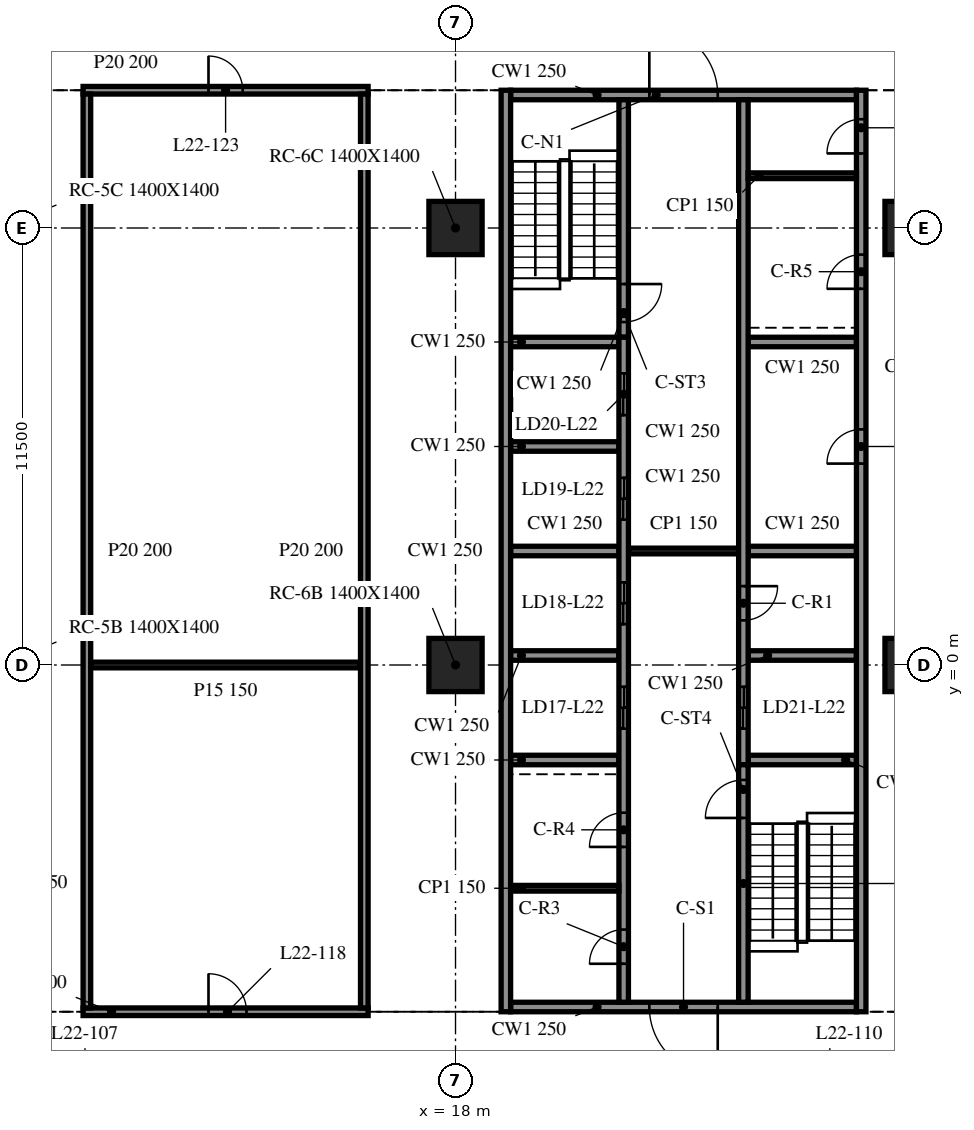
"""IFC4 building model, lengths in metres.
Left out: names, types, materials, properties, quantities, classifications, styles, units other than length and angle.
Written with IfcOpenShell. Run it as: python <this file> out.ifc"""

import sys

from ifc_helpers import new_model, si_unit, direction, frame, frame_2d, origin, origin_2d, place, context, subcontext, project, spatial, rectangle, extrude, element, fill, save


model = new_model("IFC4")
c1 = context("Model", 3, precision=1e-05, world=origin(), true_north=direction((0.0, 1.0)))
c2 = subcontext(c1, "Body", "Model", "MODEL_VIEW")
j1 = project(units=[si_unit("LENGTHUNIT", "METRE"), si_unit("PLANEANGLEUNIT", "RADIAN")], contexts=[c1])
p1 = place(None, origin())
s1 = spatial("IfcSite", under=j1, at=p1, CompositionType="ELEMENT")
p2 = place(p1, origin())
s2 = spatial("IfcBuilding", under=s1, at=p2, CompositionType="ELEMENT")
p3 = place(p2, frame((0.0, 0.0, 97.1)))
s3 = spatial("IfcBuildingStorey", under=s2, at=p3, CompositionType="ELEMENT", Elevation=97.1)
for number, where, z_axis, x_axis in (
    (1, (18.0, 0.0, -0.34), (0.0, 0.0, 1.0), (1.0, 0.0, 0.0)),
    (2, (18.0, 11.5, -0.34), (0.0, 0.0, 1.0), (1.0, 0.0, 0.0)),
    (3, (30.0, 0.0, -0.34), (0.0, 0.0, 1.0), (1.0, 0.0, 0.0)),
    (4, (30.0, 11.5, -0.34), (0.0, 0.0, 1.0), (1.0, 0.0, 0.0)),
):
    element("IfcColumn", number, at=place(p3, frame(where, z_axis=z_axis, x_axis=x_axis)), inside=s3, PredefinedType="COLUMN", context=c2, shape_type="SweptSolid", body=[
        extrude(rectangle(XDim=1.4, YDim=1.4, at=origin_2d()), origin(), (0.0, 0.0, 1.0), 4.1),
    ])
p4 = place(p3, frame((19.325, 15.125, 0.0), z_axis=(0.0, 0.0, 1.0), x_axis=(0.0, -1.0, 0.0)))
e5 = element("IfcWall", 5, at=p4, inside=s3, PredefinedType="SOLIDWALL", context=c2, shape_type="SweptSolid", body=[
    extrude(rectangle(XDim=24.25, YDim=0.25, at=frame_2d((12.125, 0.0))), origin(), (0.0, 0.0, 1.0), 3.76),
])
p5 = place(p3, frame((28.675, -9.125, 0.0), z_axis=(0.0, 0.0, 1.0), x_axis=(0.0, 1.0, 0.0)))
e6 = element("IfcWall", 6, at=p5, inside=s3, PredefinedType="SOLIDWALL", context=c2, shape_type="SweptSolid", body=[
    extrude(rectangle(XDim=24.25, YDim=0.25, at=frame_2d((12.125, 0.0))), origin(), (0.0, 0.0, 1.0), 3.76),
])
p6 = place(p5, frame((14.425, 0.0, 0.0)))
e7 = element("IfcOpeningElement", 7, at=p6, cuts=e6, PredefinedType="OPENING", context=c2, shape_type="SweptSolid", body=[
    extrude(rectangle(XDim=0.9, YDim=2.1, at=frame_2d((0.45, 1.05))), frame((0.0, 0.135, 0.0), z_axis=(0.0, -1.0, 0.0), x_axis=(1.0, 0.0, 0.0)), (0.0, 0.0, 1.0), 0.27),
])
p7 = place(p5, frame((19.025, 0.0, 0.0)))
e8 = element("IfcOpeningElement", 8, at=p7, cuts=e6, PredefinedType="OPENING", context=c2, shape_type="SweptSolid", body=[
    extrude(rectangle(XDim=0.9, YDim=2.1, at=frame_2d((0.45, 1.05))), frame((0.0, 0.135, 0.0), z_axis=(0.0, -1.0, 0.0), x_axis=(1.0, 0.0, 0.0)), (0.0, 0.0, 1.0), 0.27),
])
p8 = place(p5, frame((22.587, 0.0, 0.0)))
e9 = element("IfcOpeningElement", 9, at=p8, cuts=e6, PredefinedType="OPENING", context=c2, shape_type="SweptSolid", body=[
    extrude(rectangle(XDim=0.9, YDim=2.1, at=frame_2d((0.45, 1.05))), frame((0.0, 0.135, 0.0), z_axis=(0.0, -1.0, 0.0), x_axis=(1.0, 0.0, 0.0)), (0.0, 0.0, 1.0), 0.27),
])
p9 = place(p3, frame((28.55, -9.0, 0.0), z_axis=(0.0, 0.0, 1.0), x_axis=(-1.0, 0.0, 0.0)))
e10 = element("IfcWall", 10, at=p9, inside=s3, PredefinedType="SOLIDWALL", context=c2, shape_type="SweptSolid", body=[
    extrude(rectangle(XDim=9.1, YDim=0.25, at=frame_2d((4.55, 0.0))), origin(), (0.0, 0.0, 1.0), 3.76),
])
p10 = place(p9, frame((3.65, 0.0, 0.0)))
e11 = element("IfcOpeningElement", 11, at=p10, cuts=e10, PredefinedType="OPENING", context=c2, shape_type="SweptSolid", body=[
    extrude(rectangle(XDim=1.8, YDim=2.1, at=frame_2d((0.9, 1.05))), frame((0.0, 0.135, 0.0), z_axis=(0.0, -1.0, 0.0), x_axis=(1.0, 0.0, 0.0)), (0.0, 0.0, 1.0), 0.27),
])
p11 = place(p3, frame((19.45, 15.0, 0.0), z_axis=(0.0, 0.0, 1.0), x_axis=(1.0, 0.0, 0.0)))
e12 = element("IfcWall", 12, at=p11, inside=s3, PredefinedType="SOLIDWALL", context=c2, shape_type="SweptSolid", body=[
    extrude(rectangle(XDim=9.1, YDim=0.25, at=frame_2d((4.55, 0.0))), origin(), (0.0, 0.0, 1.0), 3.76),
])
p12 = place(p11, frame((3.65, 0.0, 0.0)))
e13 = element("IfcOpeningElement", 13, at=p12, cuts=e12, PredefinedType="OPENING", context=c2, shape_type="SweptSolid", body=[
    extrude(rectangle(XDim=1.8, YDim=2.1, at=frame_2d((0.9, 1.05))), frame((0.0, 0.135, 0.0), z_axis=(0.0, -1.0, 0.0), x_axis=(1.0, 0.0, 0.0)), (0.0, 0.0, 1.0), 0.27),
])
p13 = place(p3, frame((22.425, -8.875, 0.0), z_axis=(0.0, 0.0, 1.0), x_axis=(0.0, 1.0, 0.0)))
e14 = element("IfcWall", 14, at=p13, inside=s3, PredefinedType="SOLIDWALL", context=c2, shape_type="SweptSolid", body=[
    extrude(rectangle(XDim=17.5, YDim=0.25, at=frame_2d((8.75, 0.0))), origin(), (0.0, 0.0, 1.0), 3.76),
])
p14 = place(p13, frame((7.2, 0.0, 0.0)))
e15 = element("IfcOpeningElement", 15, at=p14, cuts=e14, PredefinedType="OPENING", context=c2, shape_type="SweptSolid", body=[
    extrude(rectangle(XDim=1.1, YDim=2.1, at=frame_2d((0.55, 1.05))), frame((0.0, 0.135, 0.0), z_axis=(0.0, -1.0, 0.0), x_axis=(1.0, 0.0, 0.0)), (0.0, 0.0, 1.0), 0.27),
])
p15 = place(p13, frame((9.95, 0.0, 0.0)))
e16 = element("IfcOpeningElement", 16, at=p15, cuts=e14, PredefinedType="OPENING", context=c2, shape_type="SweptSolid", body=[
    extrude(rectangle(XDim=1.1, YDim=2.1, at=frame_2d((0.55, 1.05))), frame((0.0, 0.135, 0.0), z_axis=(0.0, -1.0, 0.0), x_axis=(1.0, 0.0, 0.0)), (0.0, 0.0, 1.0), 0.27),
])
p16 = place(p13, frame((12.7, 0.0, 0.0)))
e17 = element("IfcOpeningElement", 17, at=p16, cuts=e14, PredefinedType="OPENING", context=c2, shape_type="SweptSolid", body=[
    extrude(rectangle(XDim=1.1, YDim=2.1, at=frame_2d((0.55, 1.05))), frame((0.0, 0.135, 0.0), z_axis=(0.0, -1.0, 0.0), x_axis=(1.0, 0.0, 0.0)), (0.0, 0.0, 1.0), 0.27),
])
p17 = place(p13, frame((15.45, 0.0, 0.0)))
e18 = element("IfcOpeningElement", 18, at=p17, cuts=e14, PredefinedType="OPENING", context=c2, shape_type="SweptSolid", body=[
    extrude(rectangle(XDim=1.1, YDim=2.1, at=frame_2d((0.55, 1.05))), frame((0.0, 0.135, 0.0), z_axis=(0.0, -1.0, 0.0), x_axis=(1.0, 0.0, 0.0)), (0.0, 0.0, 1.0), 0.27),
])
p18 = place(p13, frame((1.012, 0.0, 0.0)))
e19 = element("IfcOpeningElement", 19, at=p18, cuts=e14, PredefinedType="OPENING", context=c2, shape_type="SweptSolid", body=[
    extrude(rectangle(XDim=0.9, YDim=2.1, at=frame_2d((0.45, 1.05))), frame((0.0, 0.135, 0.0), z_axis=(0.0, -1.0, 0.0), x_axis=(1.0, 0.0, 0.0)), (0.0, 0.0, 1.0), 0.27),
])
p19 = place(p13, frame((4.087, 0.0, 0.0)))
e20 = element("IfcOpeningElement", 20, at=p19, cuts=e14, PredefinedType="OPENING", context=c2, shape_type="SweptSolid", body=[
    extrude(rectangle(XDim=0.9, YDim=2.1, at=frame_2d((0.45, 1.05))), frame((0.0, 0.135, 0.0), z_axis=(0.0, -1.0, 0.0), x_axis=(1.0, 0.0, 0.0)), (0.0, 0.0, 1.0), 0.27),
])
p20 = place(p3, frame((22.425, 14.875, 0.0), z_axis=(0.0, 0.0, 1.0), x_axis=(0.0, -1.0, 0.0)))
e21 = element("IfcWall", 21, at=p20, inside=s3, PredefinedType="SOLIDWALL", context=c2, shape_type="SweptSolid", body=[
    extrude(rectangle(XDim=6.25, YDim=0.25, at=frame_2d((3.125, 0.0))), origin(), (0.0, 0.0, 1.0), 3.76),
])
p21 = place(p20, frame((4.85, 0.0, 0.0)))
e22 = element("IfcOpeningElement", 22, at=p21, cuts=e21, PredefinedType="OPENING", context=c2, shape_type="SweptSolid", body=[
    extrude(rectangle(XDim=1.0, YDim=2.1, at=frame_2d((0.5, 1.05))), frame((0.0, 0.135, 0.0), z_axis=(0.0, -1.0, 0.0), x_axis=(1.0, 0.0, 0.0)), (0.0, 0.0, 1.0), 0.27),
])
p22 = place(p3, frame((25.575, -8.875, 0.0), z_axis=(0.0, 0.0, 1.0), x_axis=(0.0, 1.0, 0.0)))
e23 = element("IfcWall", 23, at=p22, inside=s3, PredefinedType="SOLIDWALL", context=c2, shape_type="SweptSolid", body=[
    extrude(rectangle(XDim=6.25, YDim=0.25, at=frame_2d((3.125, 0.0))), origin(), (0.0, 0.0, 1.0), 3.76),
])
p23 = place(p22, frame((4.85, 0.0, 0.0)))
e24 = element("IfcOpeningElement", 24, at=p23, cuts=e23, PredefinedType="OPENING", context=c2, shape_type="SweptSolid", body=[
    extrude(rectangle(XDim=1.0, YDim=2.1, at=frame_2d((0.5, 1.05))), frame((0.0, 0.135, 0.0), z_axis=(0.0, -1.0, 0.0), x_axis=(1.0, 0.0, 0.0)), (0.0, 0.0, 1.0), 0.27),
])
p24 = place(p3, frame((25.575, 14.875, 0.0), z_axis=(0.0, 0.0, 1.0), x_axis=(0.0, -1.0, 0.0)))
e25 = element("IfcWall", 25, at=p24, inside=s3, PredefinedType="SOLIDWALL", context=c2, shape_type="SweptSolid", body=[
    extrude(rectangle(XDim=17.5, YDim=0.25, at=frame_2d((8.75, 0.0))), origin(), (0.0, 0.0, 1.0), 3.76),
])
p25 = place(p24, frame((15.45, 0.0, 0.0)))
e26 = element("IfcOpeningElement", 26, at=p25, cuts=e25, PredefinedType="OPENING", context=c2, shape_type="SweptSolid", body=[
    extrude(rectangle(XDim=1.1, YDim=2.1, at=frame_2d((0.55, 1.05))), frame((0.0, 0.135, 0.0), z_axis=(0.0, -1.0, 0.0), x_axis=(1.0, 0.0, 0.0)), (0.0, 0.0, 1.0), 0.27),
])
p26 = place(p24, frame((12.8, 0.0, 0.0)))
e27 = element("IfcOpeningElement", 27, at=p26, cuts=e25, PredefinedType="OPENING", context=c2, shape_type="SweptSolid", body=[
    extrude(rectangle(XDim=0.9, YDim=2.1, at=frame_2d((0.45, 1.05))), frame((0.0, 0.135, 0.0), z_axis=(0.0, -1.0, 0.0), x_axis=(1.0, 0.0, 0.0)), (0.0, 0.0, 1.0), 0.27),
])
for number, where, z_axis, x_axis in (
    (28, (19.45, -2.5, 0.0), (0.0, 0.0, 1.0), (1.0, 0.0, 0.0)),
    (29, (19.45, 0.25, 0.0), (0.0, 0.0, 1.0), (1.0, 0.0, 0.0)),
    (30, (19.45, 3.0, 0.0), (0.0, 0.0, 1.0), (1.0, 0.0, 0.0)),
    (31, (19.45, 5.75, 0.0), (0.0, 0.0, 1.0), (1.0, 0.0, 0.0)),
    (32, (19.45, 8.5, 0.0), (0.0, 0.0, 1.0), (1.0, 0.0, 0.0)),
    (33, (25.7, -2.5, 0.0), (0.0, 0.0, 1.0), (1.0, 0.0, 0.0)),
    (34, (25.7, 0.25, 0.0), (0.0, 0.0, 1.0), (1.0, 0.0, 0.0)),
    (35, (25.7, 3.0, 0.0), (0.0, 0.0, 1.0), (1.0, 0.0, 0.0)),
    (36, (25.7, 8.5, 0.0), (0.0, 0.0, 1.0), (1.0, 0.0, 0.0)),
):
    element("IfcWall", number, at=place(p3, frame(where, z_axis=z_axis, x_axis=x_axis)), inside=s3, PredefinedType="SOLIDWALL", context=c2, shape_type="SweptSolid", body=[
        extrude(rectangle(XDim=2.85, YDim=0.25, at=frame_2d((1.425, 0.0))), origin(), (0.0, 0.0, 1.0), 3.76),
    ])
p27 = place(p3, frame((22.55, 3.0, 0.0), z_axis=(0.0, 0.0, 1.0), x_axis=(1.0, 0.0, 0.0)))
e37 = element("IfcWall", 37, at=p27, inside=s3, PredefinedType="PARTITIONING", context=c2, shape_type="SweptSolid", body=[
    extrude(rectangle(XDim=2.9, YDim=0.15, at=frame_2d((1.45, 0.0))), origin(), (0.0, 0.0, 1.0), 3.76),
])
for number, where, z_axis, x_axis in (
    (38, (19.45, -5.875, 0.0), (0.0, 0.0, 1.0), (1.0, 0.0, 0.0)),
    (39, (25.7, 12.875, 0.0), (0.0, 0.0, 1.0), (1.0, 0.0, 0.0)),
):
    element("IfcWall", number, at=place(p3, frame(where, z_axis=z_axis, x_axis=x_axis)), inside=s3, PredefinedType="PARTITIONING", context=c2, shape_type="SweptSolid", body=[
        extrude(rectangle(XDim=2.85, YDim=0.15, at=frame_2d((1.425, 0.0))), origin(), (0.0, 0.0, 1.0), 3.76),
    ])
p28 = place(p3, frame((8.2, -9.125, 0.0), z_axis=(0.0, 0.0, 1.0), x_axis=(1.0, 0.0, 0.0)))
e40 = element("IfcWall", 40, at=p28, inside=s3, PredefinedType="PARTITIONING", context=c2, shape_type="SweptSolid", body=[
    extrude(rectangle(XDim=7.5, YDim=0.2, at=frame_2d((3.75, 0.0))), origin(), (0.0, 0.0, 1.0), 3.76),
])
p29 = place(p28, frame((3.3, 0.0, 0.0)))
e41 = element("IfcOpeningElement", 41, at=p29, cuts=e40, PredefinedType="OPENING", context=c2, shape_type="SweptSolid", body=[
    extrude(rectangle(XDim=1.0, YDim=2.1, at=frame_2d((0.5, 1.05))), frame((0.0, 0.11, 0.0), z_axis=(0.0, -1.0, 0.0), x_axis=(1.0, 0.0, 0.0)), (0.0, 0.0, 1.0), 0.22),
])
p30 = place(p3, frame((8.4, 0.0, 0.0), z_axis=(0.0, 0.0, 1.0), x_axis=(1.0, 0.0, 0.0)))
e42 = element("IfcWall", 42, at=p30, inside=s3, PredefinedType="PARTITIONING", context=c2, shape_type="SweptSolid", body=[
    extrude(rectangle(XDim=7.1, YDim=0.15, at=frame_2d((3.55, 0.0))), origin(), (0.0, 0.0, 1.0), 3.76),
])
p31 = place(p3, frame((8.2, 15.125, 0.0), z_axis=(0.0, 0.0, 1.0), x_axis=(1.0, 0.0, 0.0)))
e43 = element("IfcWall", 43, at=p31, inside=s3, PredefinedType="PARTITIONING", context=c2, shape_type="SweptSolid", body=[
    extrude(rectangle(XDim=7.5, YDim=0.2, at=frame_2d((3.75, 0.0))), origin(), (0.0, 0.0, 1.0), 3.76),
])
p32 = place(p31, frame((3.3, 0.0, 0.0)))
e44 = element("IfcOpeningElement", 44, at=p32, cuts=e43, PredefinedType="OPENING", context=c2, shape_type="SweptSolid", body=[
    extrude(rectangle(XDim=0.9, YDim=2.1, at=frame_2d((0.45, 1.05))), frame((0.0, 0.11, 0.0), z_axis=(0.0, -1.0, 0.0), x_axis=(1.0, 0.0, 0.0)), (0.0, 0.0, 1.0), 0.22),
])
for number, where, z_axis, x_axis in (
    (45, (8.3, -9.025, 0.0), (0.0, 0.0, 1.0), (0.0, 1.0, 0.0)),
    (46, (15.6, -9.025, 0.0), (0.0, 0.0, 1.0), (0.0, 1.0, 0.0)),
):
    element("IfcWall", number, at=place(p3, frame(where, z_axis=z_axis, x_axis=x_axis)), inside=s3, PredefinedType="PARTITIONING", context=c2, shape_type="SweptSolid", body=[
        extrude(rectangle(XDim=24.05, YDim=0.2, at=frame_2d((12.025, 0.0))), origin(), (0.0, 0.0, 1.0), 3.76),
    ])
p33 = place(p10, origin())
e47 = element("IfcDoor", 47, at=p33, inside=s3, OperationType="DOUBLE_DOOR_SINGLE_SWING", PredefinedType="DOOR", context=c2, shape_type="SweptSolid", body=[
    extrude(rectangle(XDim=1.8, YDim=2.1, at=frame_2d((0.9, 1.05))), frame((0.0, 0.025, 0.0), z_axis=(0.0, -1.0, 0.0), x_axis=(1.0, 0.0, 0.0)), (0.0, 0.0, 1.0), 0.05),
])
fill(e11, e47)
p34 = place(p12, origin())
e48 = element("IfcDoor", 48, at=p34, inside=s3, OperationType="DOUBLE_DOOR_SINGLE_SWING", PredefinedType="DOOR", context=c2, shape_type="SweptSolid", body=[
    extrude(rectangle(XDim=1.8, YDim=2.1, at=frame_2d((0.9, 1.05))), frame((0.0, 0.025, 0.0), z_axis=(0.0, -1.0, 0.0), x_axis=(1.0, 0.0, 0.0)), (0.0, 0.0, 1.0), 0.05),
])
fill(e13, e48)
p35 = place(p25, origin())
e49 = element("IfcDoor", 49, at=p35, inside=s3, OperationType="DOUBLE_DOOR_SLIDING", PredefinedType="DOOR", context=c2, shape_type="SweptSolid", body=[
    extrude(rectangle(XDim=1.1, YDim=2.1, at=frame_2d((0.55, 1.05))), frame((0.0, 0.025, 0.0), z_axis=(0.0, -1.0, 0.0), x_axis=(1.0, 0.0, 0.0)), (0.0, 0.0, 1.0), 0.05),
])
fill(e26, e49)
p36 = place(p14, origin())
e50 = element("IfcDoor", 50, at=p36, inside=s3, OperationType="DOUBLE_DOOR_SLIDING", PredefinedType="DOOR", context=c2, shape_type="SweptSolid", body=[
    extrude(rectangle(XDim=1.1, YDim=2.1, at=frame_2d((0.55, 1.05))), frame((0.0, 0.025, 0.0), z_axis=(0.0, -1.0, 0.0), x_axis=(1.0, 0.0, 0.0)), (0.0, 0.0, 1.0), 0.05),
])
fill(e15, e50)
p37 = place(p15, origin())
e51 = element("IfcDoor", 51, at=p37, inside=s3, OperationType="DOUBLE_DOOR_SLIDING", PredefinedType="DOOR", context=c2, shape_type="SweptSolid", body=[
    extrude(rectangle(XDim=1.1, YDim=2.1, at=frame_2d((0.55, 1.05))), frame((0.0, 0.025, 0.0), z_axis=(0.0, -1.0, 0.0), x_axis=(1.0, 0.0, 0.0)), (0.0, 0.0, 1.0), 0.05),
])
fill(e16, e51)
p38 = place(p16, origin())
e52 = element("IfcDoor", 52, at=p38, inside=s3, OperationType="DOUBLE_DOOR_SLIDING", PredefinedType="DOOR", context=c2, shape_type="SweptSolid", body=[
    extrude(rectangle(XDim=1.1, YDim=2.1, at=frame_2d((0.55, 1.05))), frame((0.0, 0.025, 0.0), z_axis=(0.0, -1.0, 0.0), x_axis=(1.0, 0.0, 0.0)), (0.0, 0.0, 1.0), 0.05),
])
fill(e17, e52)
p39 = place(p17, origin())
e53 = element("IfcDoor", 53, at=p39, inside=s3, OperationType="DOUBLE_DOOR_SLIDING", PredefinedType="DOOR", context=c2, shape_type="SweptSolid", body=[
    extrude(rectangle(XDim=1.1, YDim=2.1, at=frame_2d((0.55, 1.05))), frame((0.0, 0.025, 0.0), z_axis=(0.0, -1.0, 0.0), x_axis=(1.0, 0.0, 0.0)), (0.0, 0.0, 1.0), 0.05),
])
fill(e18, e53)
p40 = place(p26, origin())
e54 = element("IfcDoor", 54, at=p40, inside=s3, OperationType="SINGLE_SWING_LEFT", PredefinedType="DOOR", context=c2, shape_type="SweptSolid", body=[
    extrude(rectangle(XDim=0.9, YDim=2.1, at=frame_2d((0.45, 1.05))), frame((0.0, 0.025, 0.0), z_axis=(0.0, -1.0, 0.0), x_axis=(1.0, 0.0, 0.0)), (0.0, 0.0, 1.0), 0.05),
])
fill(e27, e54)
p41 = place(p6, origin())
e55 = element("IfcDoor", 55, at=p41, inside=s3, OperationType="SINGLE_SWING_RIGHT", PredefinedType="DOOR", context=c2, shape_type="SweptSolid", body=[
    extrude(rectangle(XDim=0.9, YDim=2.1, at=frame_2d((0.45, 1.05))), frame((0.0, 0.025, 0.0), z_axis=(0.0, -1.0, 0.0), x_axis=(1.0, 0.0, 0.0)), (0.0, 0.0, 1.0), 0.05),
])
fill(e7, e55)
p42 = place(p18, origin())
e56 = element("IfcDoor", 56, at=p42, inside=s3, OperationType="SINGLE_SWING_LEFT", PredefinedType="DOOR", context=c2, shape_type="SweptSolid", body=[
    extrude(rectangle(XDim=0.9, YDim=2.1, at=frame_2d((0.45, 1.05))), frame((0.0, 0.025, 0.0), z_axis=(0.0, -1.0, 0.0), x_axis=(1.0, 0.0, 0.0)), (0.0, 0.0, 1.0), 0.05),
])
fill(e19, e56)
p43 = place(p19, origin())
e57 = element("IfcDoor", 57, at=p43, inside=s3, OperationType="SINGLE_SWING_RIGHT", PredefinedType="DOOR", context=c2, shape_type="SweptSolid", body=[
    extrude(rectangle(XDim=0.9, YDim=2.1, at=frame_2d((0.45, 1.05))), frame((0.0, 0.025, 0.0), z_axis=(0.0, -1.0, 0.0), x_axis=(1.0, 0.0, 0.0)), (0.0, 0.0, 1.0), 0.05),
])
fill(e20, e57)
p44 = place(p7, origin())
e58 = element("IfcDoor", 58, at=p44, inside=s3, OperationType="SINGLE_SWING_LEFT", PredefinedType="DOOR", context=c2, shape_type="SweptSolid", body=[
    extrude(rectangle(XDim=0.9, YDim=2.1, at=frame_2d((0.45, 1.05))), frame((0.0, 0.025, 0.0), z_axis=(0.0, -1.0, 0.0), x_axis=(1.0, 0.0, 0.0)), (0.0, 0.0, 1.0), 0.05),
])
fill(e8, e58)
p45 = place(p8, origin())
e59 = element("IfcDoor", 59, at=p45, inside=s3, OperationType="SINGLE_SWING_RIGHT", PredefinedType="DOOR", context=c2, shape_type="SweptSolid", body=[
    extrude(rectangle(XDim=0.9, YDim=2.1, at=frame_2d((0.45, 1.05))), frame((0.0, 0.025, 0.0), z_axis=(0.0, -1.0, 0.0), x_axis=(1.0, 0.0, 0.0)), (0.0, 0.0, 1.0), 0.05),
])
fill(e9, e59)
p46 = place(p21, origin())
e60 = element("IfcDoor", 60, at=p46, inside=s3, OperationType="SINGLE_SWING_LEFT", PredefinedType="DOOR", context=c2, shape_type="SweptSolid", body=[
    extrude(rectangle(XDim=1.0, YDim=2.1, at=frame_2d((0.5, 1.05))), frame((0.0, 0.025, 0.0), z_axis=(0.0, -1.0, 0.0), x_axis=(1.0, 0.0, 0.0)), (0.0, 0.0, 1.0), 0.05),
])
fill(e22, e60)
p47 = place(p23, origin())
e61 = element("IfcDoor", 61, at=p47, inside=s3, OperationType="SINGLE_SWING_RIGHT", PredefinedType="DOOR", context=c2, shape_type="SweptSolid", body=[
    extrude(rectangle(XDim=1.0, YDim=2.1, at=frame_2d((0.5, 1.05))), frame((0.0, 0.025, 0.0), z_axis=(0.0, -1.0, 0.0), x_axis=(1.0, 0.0, 0.0)), (0.0, 0.0, 1.0), 0.05),
])
fill(e24, e61)
p48 = place(p29, origin())
e62 = element("IfcDoor", 62, at=p48, inside=s3, OperationType="SINGLE_SWING_RIGHT", PredefinedType="DOOR", context=c2, shape_type="SweptSolid", body=[
    extrude(rectangle(XDim=1.0, YDim=2.1, at=frame_2d((0.5, 1.05))), frame((0.0, 0.025, 0.0), z_axis=(0.0, -1.0, 0.0), x_axis=(1.0, 0.0, 0.0)), (0.0, 0.0, 1.0), 0.05),
])
fill(e41, e62)
p49 = place(p32, origin())
e63 = element("IfcDoor", 63, at=p49, inside=s3, OperationType="SINGLE_SWING_LEFT", PredefinedType="DOOR", context=c2, shape_type="SweptSolid", body=[
    extrude(rectangle(XDim=0.9, YDim=2.1, at=frame_2d((0.45, 1.05))), frame((0.0, 0.025, 0.0), z_axis=(0.0, -1.0, 0.0), x_axis=(1.0, 0.0, 0.0)), (0.0, 0.0, 1.0), 0.05),
])
fill(e44, e63)
save(model, sys.argv[1])
